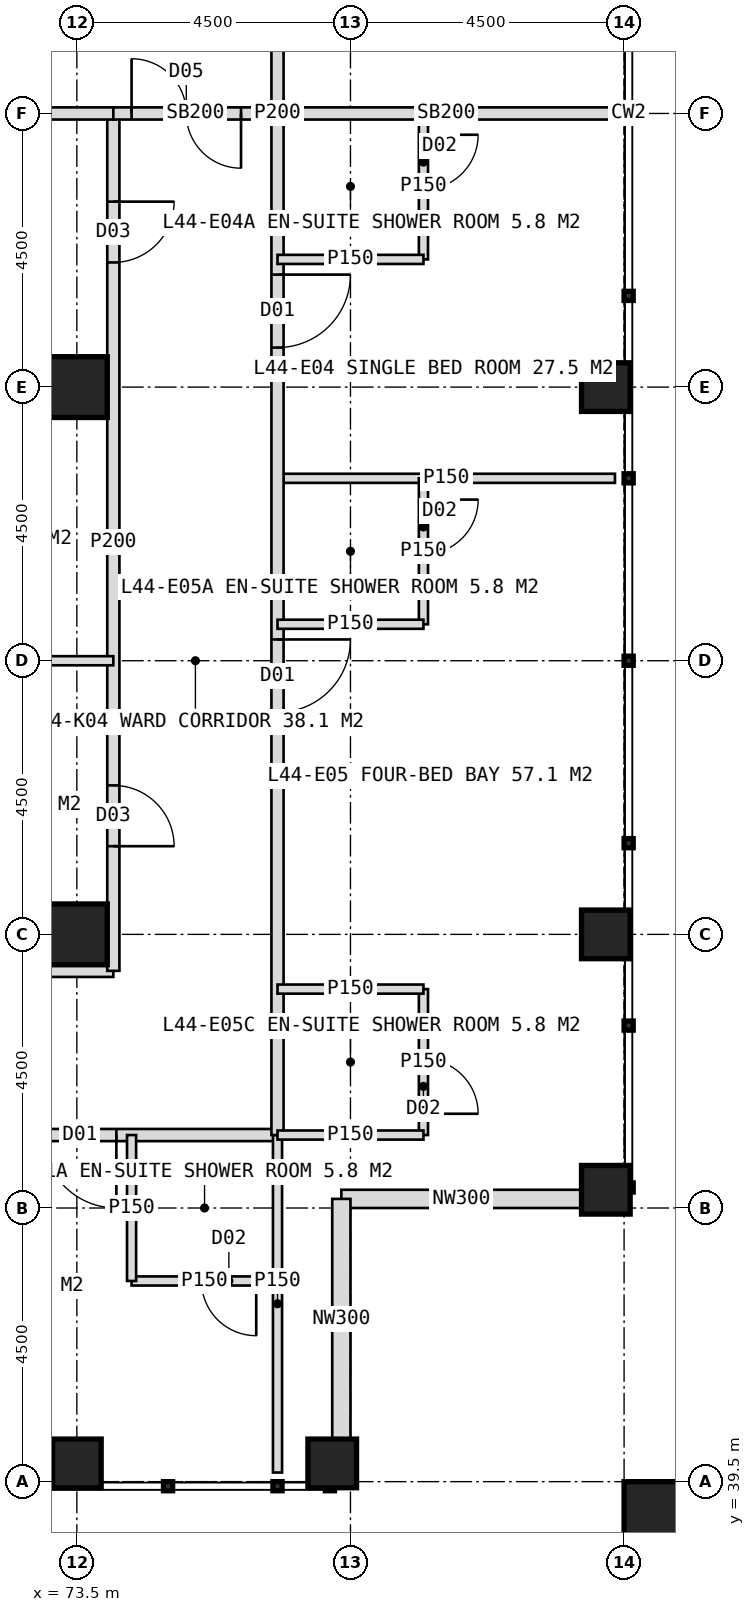
"""IFC4 building model, lengths in metres.
Left out: names, types, materials, properties, quantities, classifications, styles, units other than length and angle.
Written with IfcOpenShell. Run it as: python <this file> out.ifc"""

import sys

from ifc_helpers import new_model, si_unit, direction, frame, frame_2d, origin, origin_2d, place, context, subcontext, project, spatial, rectangle, hollow_rectangle, extrude, element, fill, save


model = new_model("IFC4")
c1 = context("Model", 3, precision=1e-05, world=origin(), true_north=direction((0.0, 1.0)))
c2 = subcontext(c1, "Body", "Model", "MODEL_VIEW")
j1 = project(units=[si_unit("LENGTHUNIT", "METRE"), si_unit("PLANEANGLEUNIT", "RADIAN")], contexts=[c1])
p1 = place(None, origin())
s1 = spatial("IfcSite", under=j1, at=p1, CompositionType="ELEMENT")
p2 = place(p1, origin())
s2 = spatial("IfcBuilding", under=s1, at=p2, CompositionType="ELEMENT")
p3 = place(p2, frame((0.0, 0.0, 185.0)))
s3 = spatial("IfcBuildingStorey", under=s2, at=p3, CompositionType="ELEMENT", Elevation=185.0)
for number, where, z_axis, x_axis in (
    (1, (73.5, 48.5, 0.0), (0.0, 0.0, 1.0), (1.0, 0.0, 0.0)),
    (2, (73.5, 57.5, 0.0), (0.0, 0.0, 1.0), (1.0, 0.0, 0.0)),
):
    element("IfcColumn", number, at=place(p3, frame(where, z_axis=z_axis, x_axis=x_axis)), inside=s3, PredefinedType="COLUMN", context=c2, shape_type="SweptSolid", body=[
        extrude(hollow_rectangle(XDim=1.0, YDim=1.0, WallThickness=0.1, at=origin_2d()), origin(), (0.0, 0.0, 1.0), 4.0),
    ])
for number, where, z_axis, x_axis in (
    (3, (82.2, 44.3, 0.0), (0.0, 0.0, 1.0), (1.0, 0.0, 0.0)),
    (4, (82.2, 48.5, 0.0), (0.0, 0.0, 1.0), (1.0, 0.0, 0.0)),
    (5, (82.2, 57.5, 0.0), (0.0, 0.0, 1.0), (1.0, 0.0, 0.0)),
    (6, (73.5, 39.8, 0.0), (0.0, 0.0, 1.0), (1.0, 0.0, 0.0)),
    (7, (77.7, 39.8, 0.0), (0.0, 0.0, 1.0), (1.0, 0.0, 0.0)),
):
    element("IfcColumn", number, at=place(p3, frame(where, z_axis=z_axis, x_axis=x_axis)), inside=s3, PredefinedType="COLUMN", context=c2, shape_type="SweptSolid", body=[
        extrude(hollow_rectangle(XDim=0.8, YDim=0.8, WallThickness=0.08, at=origin_2d()), origin(), (0.0, 0.0, 1.0), 4.0),
    ])
p4 = place(p3, frame((83.1, 38.9, 0.0), z_axis=(0.0, 0.0, 1.0), x_axis=(1.0, 0.0, 0.0)))
e8 = element("IfcColumn", 8, at=p4, inside=s3, PredefinedType="COLUMN", context=c2, shape_type="SweptSolid", body=[
    extrude(hollow_rectangle(XDim=1.2, YDim=1.2, WallThickness=0.07, at=origin_2d()), origin(), (0.0, 0.0, 1.0), 4.0),
])
for number, where, z_axis, x_axis in (
    (9, (81.8, 44.15, 0.0), (0.0, 0.0, 1.0), (-1.0, 0.0, 0.0)),
    (10, (77.85, 44.15, 0.0), (0.0, 0.0, 1.0), (0.0, -1.0, 0.0)),
):
    element("IfcWall", number, at=place(p3, frame(where, z_axis=z_axis, x_axis=x_axis)), inside=s3, PredefinedType="ELEMENTEDWALL", context=c2, shape_type="SweptSolid", body=[
        extrude(rectangle(XDim=3.95, YDim=0.3, at=frame_2d((1.975, 0.0))), origin(), (0.0, 0.0, 1.0), 2.85),
    ])
p5 = place(p3, frame((76.8, 45.2, 0.0), z_axis=(0.0, 0.0, 1.0), x_axis=(-1.0, 0.0, 0.0)))
e11 = element("IfcWall", 11, at=p5, inside=s3, PredefinedType="PARTITIONING", context=c2, shape_type="SweptSolid", body=[
    extrude(rectangle(XDim=33.6, YDim=0.2, at=frame_2d((16.8, 0.0))), origin(), (0.0, 0.0, 1.0), 3.75),
])
p6 = place(p5, frame((2.65, 0.0, 0.0)))
e12 = element("IfcOpeningElement", 12, at=p6, cuts=e11, PredefinedType="OPENING", context=c2, shape_type="SweptSolid", body=[
    extrude(rectangle(XDim=1.2, YDim=2.2, at=frame_2d((0.6, 1.1))), frame((0.0, 0.11, 0.0), z_axis=(0.0, -1.0, 0.0), x_axis=(1.0, 0.0, 0.0)), (0.0, 0.0, 1.0), 0.22),
])
p7 = place(p5, frame((14.05, 0.0, 0.0)))
e13 = element("IfcOpeningElement", 13, at=p7, cuts=e11, PredefinedType="OPENING", context=c2, shape_type="SweptSolid", body=[
    extrude(rectangle(XDim=1.2, YDim=2.2, at=frame_2d((0.6, 1.1))), frame((0.0, 0.11, 0.0), z_axis=(0.0, -1.0, 0.0), x_axis=(1.0, 0.0, 0.0)), (0.0, 0.0, 1.0), 0.22),
])
p8 = place(p5, frame((22.45, 0.0, 0.0)))
e14 = element("IfcOpeningElement", 14, at=p8, cuts=e11, PredefinedType="OPENING", context=c2, shape_type="SweptSolid", body=[
    extrude(rectangle(XDim=1.2, YDim=2.2, at=frame_2d((0.6, 1.1))), frame((0.0, 0.11, 0.0), z_axis=(0.0, -1.0, 0.0), x_axis=(1.0, 0.0, 0.0)), (0.0, 0.0, 1.0), 0.22),
])
p9 = place(p3, frame((76.8, 45.2, 0.0), z_axis=(0.0, 0.0, 1.0), x_axis=(0.0, -1.0, 0.0)))
e15 = element("IfcWall", 15, at=p9, inside=s3, PredefinedType="PARTITIONING", context=c2, shape_type="SweptSolid", body=[
    extrude(rectangle(XDim=5.55, YDim=0.15, at=frame_2d((2.775, 0.0))), origin(), (0.0, 0.0, 1.0), 3.75),
])
p10 = place(p3, frame((76.8, 42.8, 0.0), z_axis=(0.0, 0.0, 1.0), x_axis=(-1.0, 0.0, 0.0)))
e16 = element("IfcWall", 16, at=p10, inside=s3, PredefinedType="PARTITIONING", context=c2, shape_type="SweptSolid", body=[
    extrude(rectangle(XDim=2.4, YDim=0.15, at=frame_2d((1.2, 0.0))), origin(), (0.0, 0.0, 1.0), 3.75),
])
p11 = place(p10, frame((0.35, 0.0, 0.0)))
e17 = element("IfcOpeningElement", 17, at=p11, cuts=e16, PredefinedType="OPENING", context=c2, shape_type="SweptSolid", body=[
    extrude(rectangle(XDim=0.9, YDim=2.1, at=frame_2d((0.45, 1.05))), frame((0.0, 0.085, 0.0), z_axis=(0.0, -1.0, 0.0), x_axis=(1.0, 0.0, 0.0)), (0.0, 0.0, 1.0), 0.17),
])
p12 = place(p3, frame((74.4, 45.2, 0.0), z_axis=(0.0, 0.0, 1.0), x_axis=(0.0, -1.0, 0.0)))
e18 = element("IfcWall", 18, at=p12, inside=s3, PredefinedType="PARTITIONING", context=c2, shape_type="SweptSolid", body=[
    extrude(rectangle(XDim=2.4, YDim=0.15, at=frame_2d((1.2, 0.0))), origin(), (0.0, 0.0, 1.0), 3.75),
])
p13 = place(p3, frame((74.1, 47.9, 0.0), z_axis=(0.0, 0.0, 1.0), x_axis=(-1.0, 0.0, 0.0)))
e19 = element("IfcWall", 19, at=p13, inside=s3, PredefinedType="PARTITIONING", context=c2, shape_type="SweptSolid", body=[
    extrude(rectangle(XDim=5.1, YDim=0.2, at=frame_2d((2.55, 0.0))), origin(), (0.0, 0.0, 1.0), 3.75),
])
p14 = place(p3, frame((76.8, 62.0, 0.0), z_axis=(0.0, 0.0, 1.0), x_axis=(1.0, 0.0, 0.0)))
e20 = element("IfcWall", 20, at=p14, inside=s3, PredefinedType="SOLIDWALL", context=c2, shape_type="SweptSolid", body=[
    extrude(rectangle(XDim=5.55, YDim=0.2, at=frame_2d((2.775, 0.0))), origin(), (0.0, 0.0, 1.0), 2.95),
])
p15 = place(p3, frame((76.8, 56.0, 0.0), z_axis=(0.0, 0.0, 1.0), x_axis=(1.0, 0.0, 0.0)))
e21 = element("IfcWall", 21, at=p15, inside=s3, PredefinedType="PARTITIONING", context=c2, shape_type="SweptSolid", body=[
    extrude(rectangle(XDim=5.55, YDim=0.15, at=frame_2d((2.775, 0.0))), origin(), (0.0, 0.0, 1.0), 3.75),
])
p16 = place(p3, frame((76.8, 78.8, 0.0), z_axis=(0.0, 0.0, 1.0), x_axis=(0.0, -1.0, 0.0)))
e22 = element("IfcWall", 22, at=p16, inside=s3, PredefinedType="PARTITIONING", context=c2, shape_type="SweptSolid", body=[
    extrude(rectangle(XDim=33.6, YDim=0.2, at=frame_2d((16.8, 0.0))), origin(), (0.0, 0.0, 1.0), 3.75),
])
p17 = place(p16, frame((2.65, 0.0, 0.0)))
e23 = element("IfcOpeningElement", 23, at=p17, cuts=e22, PredefinedType="OPENING", context=c2, shape_type="SweptSolid", body=[
    extrude(rectangle(XDim=1.2, YDim=2.2, at=frame_2d((0.6, 1.1))), frame((0.0, 0.11, 0.0), z_axis=(0.0, -1.0, 0.0), x_axis=(1.0, 0.0, 0.0)), (0.0, 0.0, 1.0), 0.22),
])
p18 = place(p16, frame((7.45, 0.0, 0.0)))
e24 = element("IfcOpeningElement", 24, at=p18, cuts=e22, PredefinedType="OPENING", context=c2, shape_type="SweptSolid", body=[
    extrude(rectangle(XDim=1.2, YDim=2.2, at=frame_2d((0.6, 1.1))), frame((0.0, 0.11, 0.0), z_axis=(0.0, -1.0, 0.0), x_axis=(1.0, 0.0, 0.0)), (0.0, 0.0, 1.0), 0.22),
])
p19 = place(p16, frame((13.45, 0.0, 0.0)))
e25 = element("IfcOpeningElement", 25, at=p19, cuts=e22, PredefinedType="OPENING", context=c2, shape_type="SweptSolid", body=[
    extrude(rectangle(XDim=1.2, YDim=2.2, at=frame_2d((0.6, 1.1))), frame((0.0, 0.11, 0.0), z_axis=(0.0, -1.0, 0.0), x_axis=(1.0, 0.0, 0.0)), (0.0, 0.0, 1.0), 0.22),
])
p20 = place(p16, frame((19.45, 0.0, 0.0)))
e26 = element("IfcOpeningElement", 26, at=p20, cuts=e22, PredefinedType="OPENING", context=c2, shape_type="SweptSolid", body=[
    extrude(rectangle(XDim=1.2, YDim=2.2, at=frame_2d((0.6, 1.1))), frame((0.0, 0.11, 0.0), z_axis=(0.0, -1.0, 0.0), x_axis=(1.0, 0.0, 0.0)), (0.0, 0.0, 1.0), 0.22),
])
p21 = place(p16, frame((25.45, 0.0, 0.0)))
e27 = element("IfcOpeningElement", 27, at=p21, cuts=e22, PredefinedType="OPENING", context=c2, shape_type="SweptSolid", body=[
    extrude(rectangle(XDim=1.2, YDim=2.2, at=frame_2d((0.6, 1.1))), frame((0.0, 0.11, 0.0), z_axis=(0.0, -1.0, 0.0), x_axis=(1.0, 0.0, 0.0)), (0.0, 0.0, 1.0), 0.22),
])
p22 = place(p3, frame((79.2, 62.0, 0.0), z_axis=(0.0, 0.0, 1.0), x_axis=(0.0, -1.0, 0.0)))
e28 = element("IfcWall", 28, at=p22, inside=s3, PredefinedType="PARTITIONING", context=c2, shape_type="SweptSolid", body=[
    extrude(rectangle(XDim=2.4, YDim=0.15, at=frame_2d((1.2, 0.0))), origin(), (0.0, 0.0, 1.0), 3.75),
])
p23 = place(p22, frame((0.35, 0.0, 0.0)))
e29 = element("IfcOpeningElement", 29, at=p23, cuts=e28, PredefinedType="OPENING", context=c2, shape_type="SweptSolid", body=[
    extrude(rectangle(XDim=0.9, YDim=2.1, at=frame_2d((0.45, 1.05))), frame((0.0, 0.085, 0.0), z_axis=(0.0, -1.0, 0.0), x_axis=(1.0, 0.0, 0.0)), (0.0, 0.0, 1.0), 0.17),
])
p24 = place(p3, frame((76.8, 59.6, 0.0), z_axis=(0.0, 0.0, 1.0), x_axis=(1.0, 0.0, 0.0)))
e30 = element("IfcWall", 30, at=p24, inside=s3, PredefinedType="PARTITIONING", context=c2, shape_type="SweptSolid", body=[
    extrude(rectangle(XDim=2.4, YDim=0.15, at=frame_2d((1.2, 0.0))), origin(), (0.0, 0.0, 1.0), 3.75),
])
p25 = place(p3, frame((79.2, 56.0, 0.0), z_axis=(0.0, 0.0, 1.0), x_axis=(0.0, -1.0, 0.0)))
e31 = element("IfcWall", 31, at=p25, inside=s3, PredefinedType="PARTITIONING", context=c2, shape_type="SweptSolid", body=[
    extrude(rectangle(XDim=2.4, YDim=0.15, at=frame_2d((1.2, 0.0))), origin(), (0.0, 0.0, 1.0), 3.75),
])
p26 = place(p25, frame((0.35, 0.0, 0.0)))
e32 = element("IfcOpeningElement", 32, at=p26, cuts=e31, PredefinedType="OPENING", context=c2, shape_type="SweptSolid", body=[
    extrude(rectangle(XDim=0.9, YDim=2.1, at=frame_2d((0.45, 1.05))), frame((0.0, 0.085, 0.0), z_axis=(0.0, -1.0, 0.0), x_axis=(1.0, 0.0, 0.0)), (0.0, 0.0, 1.0), 0.17),
])
p27 = place(p3, frame((76.8, 53.6, 0.0), z_axis=(0.0, 0.0, 1.0), x_axis=(1.0, 0.0, 0.0)))
e33 = element("IfcWall", 33, at=p27, inside=s3, PredefinedType="PARTITIONING", context=c2, shape_type="SweptSolid", body=[
    extrude(rectangle(XDim=2.4, YDim=0.15, at=frame_2d((1.2, 0.0))), origin(), (0.0, 0.0, 1.0), 3.75),
])
p28 = place(p3, frame((79.2, 47.6, 0.0), z_axis=(0.0, 0.0, 1.0), x_axis=(0.0, -1.0, 0.0)))
e34 = element("IfcWall", 34, at=p28, inside=s3, PredefinedType="PARTITIONING", context=c2, shape_type="SweptSolid", body=[
    extrude(rectangle(XDim=2.4, YDim=0.15, at=frame_2d((1.2, 0.0))), origin(), (0.0, 0.0, 1.0), 3.75),
])
p29 = place(p28, frame((1.15, 0.0, 0.0)))
e35 = element("IfcOpeningElement", 35, at=p29, cuts=e34, PredefinedType="OPENING", context=c2, shape_type="SweptSolid", body=[
    extrude(rectangle(XDim=0.9, YDim=2.1, at=frame_2d((0.45, 1.05))), frame((0.0, 0.085, 0.0), z_axis=(0.0, -1.0, 0.0), x_axis=(1.0, 0.0, 0.0)), (0.0, 0.0, 1.0), 0.17),
])
for number, where, z_axis, x_axis in (
    (36, (76.8, 47.6, 0.0), (0.0, 0.0, 1.0), (1.0, 0.0, 0.0)),
    (37, (76.8, 45.2, 0.0), (0.0, 0.0, 1.0), (1.0, 0.0, 0.0)),
):
    element("IfcWall", number, at=place(p3, frame(where, z_axis=z_axis, x_axis=x_axis)), inside=s3, PredefinedType="PARTITIONING", context=c2, shape_type="SweptSolid", body=[
        extrude(rectangle(XDim=2.4, YDim=0.15, at=frame_2d((1.2, 0.0))), origin(), (0.0, 0.0, 1.0), 3.75),
    ])
p30 = place(p3, frame((74.1, 62.0, 0.0), z_axis=(0.0, 0.0, 1.0), x_axis=(0.0, -1.0, 0.0)))
e38 = element("IfcWall", 38, at=p30, inside=s3, PredefinedType="PARTITIONING", context=c2, shape_type="SweptSolid", body=[
    extrude(rectangle(XDim=14.1, YDim=0.2, at=frame_2d((7.05, 0.0))), origin(), (0.0, 0.0, 1.0), 3.75),
])
p31 = place(p30, frame((1.45, 0.0, 0.0)))
e39 = element("IfcOpeningElement", 39, at=p31, cuts=e38, PredefinedType="OPENING", context=c2, shape_type="SweptSolid", body=[
    extrude(rectangle(XDim=1.0, YDim=2.1, at=frame_2d((0.5, 1.05))), frame((0.0, 0.11, 0.0), z_axis=(0.0, -1.0, 0.0), x_axis=(1.0, 0.0, 0.0)), (0.0, 0.0, 1.0), 0.22),
])
p32 = place(p30, frame((11.05, 0.0, 0.0)))
e40 = element("IfcOpeningElement", 40, at=p32, cuts=e38, PredefinedType="OPENING", context=c2, shape_type="SweptSolid", body=[
    extrude(rectangle(XDim=1.0, YDim=2.1, at=frame_2d((0.5, 1.05))), frame((0.0, 0.11, 0.0), z_axis=(0.0, -1.0, 0.0), x_axis=(1.0, 0.0, 0.0)), (0.0, 0.0, 1.0), 0.22),
])
p33 = place(p3, frame((69.0, 62.0, 0.0), z_axis=(0.0, 0.0, 1.0), x_axis=(1.0, 0.0, 0.0)))
e41 = element("IfcWall", 41, at=p33, inside=s3, PredefinedType="SOLIDWALL", context=c2, shape_type="SweptSolid", body=[
    extrude(rectangle(XDim=5.1, YDim=0.2, at=frame_2d((2.55, 0.0))), origin(), (0.0, 0.0, 1.0), 2.95),
])
p34 = place(p3, frame((69.0, 53.0, 0.0), z_axis=(0.0, 0.0, 1.0), x_axis=(1.0, 0.0, 0.0)))
e42 = element("IfcWall", 42, at=p34, inside=s3, PredefinedType="PARTITIONING", context=c2, shape_type="SweptSolid", body=[
    extrude(rectangle(XDim=5.1, YDim=0.15, at=frame_2d((2.55, 0.0))), origin(), (0.0, 0.0, 1.0), 3.75),
])
p35 = place(p3, frame((74.1, 62.0, 0.0), z_axis=(0.0, 0.0, 1.0), x_axis=(1.0, 0.0, 0.0)))
e43 = element("IfcWall", 43, at=p35, inside=s3, PredefinedType="SOLIDWALL", context=c2, shape_type="SweptSolid", body=[
    extrude(rectangle(XDim=2.7, YDim=0.2, at=frame_2d((1.35, 0.0))), origin(), (0.0, 0.0, 1.0), 2.95),
])
p36 = place(p35, frame((0.3, 0.0, 0.0)))
e44 = element("IfcOpeningElement", 44, at=p36, cuts=e43, PredefinedType="OPENING", context=c2, shape_type="SweptSolid", body=[
    extrude(rectangle(XDim=1.8, YDim=2.2, at=frame_2d((0.9, 1.1))), frame((0.0, 0.11, 0.0), z_axis=(0.0, -1.0, 0.0), x_axis=(1.0, 0.0, 0.0)), (0.0, 0.0, 1.0), 0.22),
])
p37 = place(p6, origin())
e45 = element("IfcDoor", 45, at=p37, inside=s3, OperationType="SINGLE_SWING_LEFT", PredefinedType="DOOR", context=c2, shape_type="SweptSolid", body=[
    extrude(rectangle(XDim=1.2, YDim=2.2, at=frame_2d((0.6, 1.1))), frame((0.0, 0.025, 0.0), z_axis=(0.0, -1.0, 0.0), x_axis=(1.0, 0.0, 0.0)), (0.0, 0.0, 1.0), 0.05),
])
fill(e12, e45)
p38 = place(p11, origin())
e46 = element("IfcDoor", 46, at=p38, inside=s3, OperationType="SINGLE_SWING_LEFT", PredefinedType="DOOR", context=c2, shape_type="SweptSolid", body=[
    extrude(rectangle(XDim=0.9, YDim=2.1, at=frame_2d((0.45, 1.05))), frame((0.0, 0.025, 0.0), z_axis=(0.0, -1.0, 0.0), x_axis=(1.0, 0.0, 0.0)), (0.0, 0.0, 1.0), 0.05),
])
fill(e17, e46)
p39 = place(p20, origin())
e47 = element("IfcDoor", 47, at=p39, inside=s3, OperationType="SINGLE_SWING_LEFT", PredefinedType="DOOR", context=c2, shape_type="SweptSolid", body=[
    extrude(rectangle(XDim=1.2, YDim=2.2, at=frame_2d((0.6, 1.1))), frame((0.0, 0.025, 0.0), z_axis=(0.0, -1.0, 0.0), x_axis=(1.0, 0.0, 0.0)), (0.0, 0.0, 1.0), 0.05),
])
fill(e26, e47)
p40 = place(p23, origin())
e48 = element("IfcDoor", 48, at=p40, inside=s3, OperationType="SINGLE_SWING_LEFT", PredefinedType="DOOR", context=c2, shape_type="SweptSolid", body=[
    extrude(rectangle(XDim=0.9, YDim=2.1, at=frame_2d((0.45, 1.05))), frame((0.0, 0.025, 0.0), z_axis=(0.0, -1.0, 0.0), x_axis=(1.0, 0.0, 0.0)), (0.0, 0.0, 1.0), 0.05),
])
fill(e29, e48)
p41 = place(p21, origin())
e49 = element("IfcDoor", 49, at=p41, inside=s3, OperationType="SINGLE_SWING_LEFT", PredefinedType="DOOR", context=c2, shape_type="SweptSolid", body=[
    extrude(rectangle(XDim=1.2, YDim=2.2, at=frame_2d((0.6, 1.1))), frame((0.0, 0.025, 0.0), z_axis=(0.0, -1.0, 0.0), x_axis=(1.0, 0.0, 0.0)), (0.0, 0.0, 1.0), 0.05),
])
fill(e27, e49)
p42 = place(p26, origin())
e50 = element("IfcDoor", 50, at=p42, inside=s3, OperationType="SINGLE_SWING_LEFT", PredefinedType="DOOR", context=c2, shape_type="SweptSolid", body=[
    extrude(rectangle(XDim=0.9, YDim=2.1, at=frame_2d((0.45, 1.05))), frame((0.0, 0.025, 0.0), z_axis=(0.0, -1.0, 0.0), x_axis=(1.0, 0.0, 0.0)), (0.0, 0.0, 1.0), 0.05),
])
fill(e32, e50)
p43 = place(p29, origin())
e51 = element("IfcDoor", 51, at=p43, inside=s3, OperationType="SINGLE_SWING_RIGHT", PredefinedType="DOOR", context=c2, shape_type="SweptSolid", body=[
    extrude(rectangle(XDim=0.9, YDim=2.1, at=frame_2d((0.45, 1.05))), frame((0.0, 0.025, 0.0), z_axis=(0.0, -1.0, 0.0), x_axis=(1.0, 0.0, 0.0)), (0.0, 0.0, 1.0), 0.05),
])
fill(e35, e51)
p44 = place(p31, origin())
e52 = element("IfcDoor", 52, at=p44, inside=s3, OperationType="SINGLE_SWING_LEFT", PredefinedType="DOOR", context=c2, shape_type="SweptSolid", body=[
    extrude(rectangle(XDim=1.0, YDim=2.1, at=frame_2d((0.5, 1.05))), frame((0.0, 0.025, 0.0), z_axis=(0.0, -1.0, 0.0), x_axis=(1.0, 0.0, 0.0)), (0.0, 0.0, 1.0), 0.05),
])
fill(e39, e52)
p45 = place(p32, origin())
e53 = element("IfcDoor", 53, at=p45, inside=s3, OperationType="SINGLE_SWING_RIGHT", PredefinedType="DOOR", context=c2, shape_type="SweptSolid", body=[
    extrude(rectangle(XDim=1.0, YDim=2.1, at=frame_2d((0.5, 1.05))), frame((0.0, 0.025, 0.0), z_axis=(0.0, -1.0, 0.0), x_axis=(1.0, 0.0, 0.0)), (0.0, 0.0, 1.0), 0.05),
])
fill(e40, e53)
p46 = place(p36, origin())
e54 = element("IfcDoor", 54, at=p46, inside=s3, OperationType="DOUBLE_DOOR_DOUBLE_SWING", PredefinedType="DOOR", context=c2, shape_type="SweptSolid", body=[
    extrude(rectangle(XDim=1.8, YDim=2.2, at=frame_2d((0.9, 1.1))), frame((0.0, 0.025, 0.0), z_axis=(0.0, -1.0, 0.0), x_axis=(1.0, 0.0, 0.0)), (0.0, 0.0, 1.0), 0.05),
])
fill(e44, e54)
save(model, sys.argv[1])
